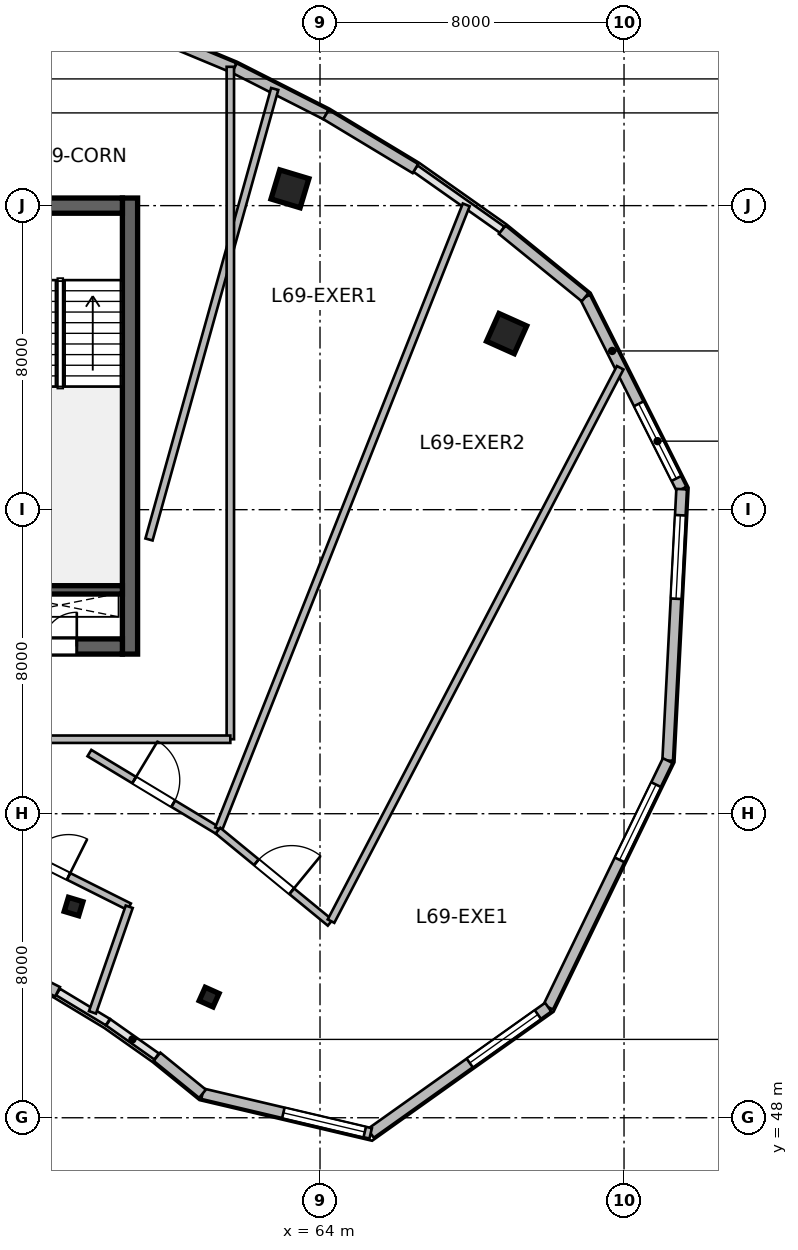
"""IFC4 building model, lengths in metres.
Left out: names, types, materials, properties, quantities, classifications, styles, units other than length and angle.
Written with IfcOpenShell. Run it as: python <this file> out.ifc"""

import sys

from ifc_helpers import new_model, si_unit, direction, frame, frame_2d, origin, origin_2d, place, context, subcontext, project, spatial, rectangle, i_section, extrude, source, transform, mapped, element, fill, save


model = new_model("IFC4")
c1 = context("Model", 3, precision=1e-05, world=origin(), true_north=direction((0.0, 1.0)))
c2 = subcontext(c1, "Body", "Model", "MODEL_VIEW")
j1 = project(units=[si_unit("LENGTHUNIT", "METRE"), si_unit("PLANEANGLEUNIT", "RADIAN")], contexts=[c1])
p1 = place(None, origin())
s1 = spatial("IfcSite", under=j1, at=p1, CompositionType="ELEMENT")
p2 = place(p1, origin())
s2 = spatial("IfcBuilding", under=s1, at=p2, CompositionType="ELEMENT")
p3 = place(p2, frame((0.0, 0.0, 283.5)))
s3 = spatial("IfcBuildingStorey", under=s2, at=p3, CompositionType="ELEMENT", Elevation=283.5)
m1 = source(origin(), c2, "Body", "SweptSolid", [
    extrude(rectangle(XDim=12.0, YDim=0.4, at=frame_2d((6.0, 0.0))), origin(), (0.0, 0.0, 1.0), 3.9),
])
p4 = place(p3, frame((59.0, 60.2, 0.0), z_axis=(0.0, 0.0, 1.0), x_axis=(0.0, 1.0, 0.0)))
e1 = element("IfcWall", 1, at=p4, inside=s3, PredefinedType="SHEAR", context=c2, shape_type="MappedRepresentation", body=[
    mapped(m1, transform((0.0, 0.0, 0.0), scale=1.0)),
])
m2 = source(origin(), c2, "Body", "SweptSolid", [
    extrude(rectangle(XDim=21.6, YDim=0.4, at=frame_2d((10.8, 0.0))), origin(), (0.0, 0.0, 1.0), 3.9),
])
p5 = place(p3, frame((37.2, 60.4, 0.0), z_axis=(0.0, 0.0, 1.0), x_axis=(1.0, 0.0, 0.0)))
e2 = element("IfcWall", 2, at=p5, inside=s3, PredefinedType="SHEAR", context=c2, shape_type="MappedRepresentation", body=[
    mapped(m2, transform((0.0, 0.0, 0.0), scale=1.0)),
])
p6 = place(p5, frame((1.1, 0.0, 0.0)))
e3 = element("IfcOpeningElement", 3, at=p6, cuts=e2, PredefinedType="OPENING", context=c2, shape_type="SweptSolid", body=[
    extrude(rectangle(XDim=1.15, YDim=2.15, at=frame_2d((0.575, 1.075))), frame((0.0, 0.21, 0.0), z_axis=(0.0, -1.0, 0.0), x_axis=(1.0, 0.0, 0.0)), (0.0, 0.0, 1.0), 0.42),
])
p7 = place(p5, frame((19.5, 0.0, 0.0)))
e4 = element("IfcOpeningElement", 4, at=p7, cuts=e2, PredefinedType="OPENING", context=c2, shape_type="SweptSolid", body=[
    extrude(rectangle(XDim=0.9, YDim=2.1, at=frame_2d((0.45, 1.05))), frame((0.0, 0.21, 0.0), z_axis=(0.0, -1.0, 0.0), x_axis=(1.0, 0.0, 0.0)), (0.0, 0.0, 1.0), 0.42),
])
p8 = place(p5, frame((12.02, 0.0, 0.0)))
e5 = element("IfcOpeningElement", 5, at=p8, cuts=e2, PredefinedType="OPENING", context=c2, shape_type="SweptSolid", body=[
    extrude(rectangle(XDim=1.6, YDim=2.15, at=frame_2d((0.8, 1.075))), frame((0.0, 0.21, 0.0), z_axis=(0.0, -1.0, 0.0), x_axis=(1.0, 0.0, 0.0)), (0.0, 0.0, 1.0), 0.42),
])
p9 = place(p3, frame((37.2, 72.0, 0.0), z_axis=(0.0, 0.0, 1.0), x_axis=(1.0, 0.0, 0.0)))
e6 = element("IfcWall", 6, at=p9, inside=s3, PredefinedType="SHEAR", context=c2, shape_type="MappedRepresentation", body=[
    mapped(m2, transform((0.0, 0.0, 0.0), scale=1.0)),
])
p10 = place(p9, frame((1.2, 0.0, 0.0)))
e7 = element("IfcOpeningElement", 7, at=p10, cuts=e6, PredefinedType="OPENING", context=c2, shape_type="SweptSolid", body=[
    extrude(rectangle(XDim=0.9, YDim=2.1, at=frame_2d((0.45, 1.05))), frame((0.0, 0.21, 0.0), z_axis=(0.0, -1.0, 0.0), x_axis=(1.0, 0.0, 0.0)), (0.0, 0.0, 1.0), 0.42),
])
p11 = place(p9, frame((14.7, 0.0, 0.0)))
e8 = element("IfcOpeningElement", 8, at=p11, cuts=e6, PredefinedType="OPENING", context=c2, shape_type="SweptSolid", body=[
    extrude(rectangle(XDim=1.2, YDim=2.15, at=frame_2d((0.6, 1.075))), frame((0.0, 0.21, 0.0), z_axis=(0.0, -1.0, 0.0), x_axis=(1.0, 0.0, 0.0)), (0.0, 0.0, 1.0), 0.42),
])
p12 = place(p9, frame((4.15, 0.0, 0.0)))
e9 = element("IfcOpeningElement", 9, at=p12, cuts=e6, PredefinedType="OPENING", context=c2, shape_type="SweptSolid", body=[
    extrude(rectangle(XDim=1.3, YDim=2.15, at=frame_2d((0.65, 1.075))), frame((0.0, 0.21, 0.0), z_axis=(0.0, -1.0, 0.0), x_axis=(1.0, 0.0, 0.0)), (0.0, 0.0, 1.0), 0.42),
])
p13 = place(p9, frame((7.25, 0.0, 0.0)))
e10 = element("IfcOpeningElement", 10, at=p13, cuts=e6, PredefinedType="OPENING", context=c2, shape_type="SweptSolid", body=[
    extrude(rectangle(XDim=0.9, YDim=2.1, at=frame_2d((0.45, 1.05))), frame((0.0, 0.21, 0.0), z_axis=(0.0, -1.0, 0.0), x_axis=(1.0, 0.0, 0.0)), (0.0, 0.0, 1.0), 0.42),
])
m3 = source(origin(), c2, "Body", "SweptSolid", [
    extrude(rectangle(XDim=3.27, YDim=0.22, at=frame_2d((1.635, 0.0))), origin(), (0.0, 0.0, 1.0), 3.9),
])
p14 = place(p3, frame((55.53, 61.89, 0.0), z_axis=(0.0, 0.0, 1.0), x_axis=(1.0, 0.0, 0.0)))
e11 = element("IfcWall", 11, at=p14, inside=s3, PredefinedType="SHEAR", context=c2, shape_type="MappedRepresentation", body=[
    mapped(m3, transform((0.0, 0.0, 0.0), scale=1.0)),
])
m4 = source(origin(), c2, "Body", "SweptSolid", [
    extrude(i_section(OverallWidth=0.399, OverallDepth=0.387, WebThickness=0.021, FlangeThickness=0.033, at=origin_2d()), origin(), (0.0, 0.0, 1.0), 3.9),
])
p15 = place(p3, frame((57.515, 53.558, 0.0), z_axis=(0.0, 0.0, 1.0), x_axis=(0.288697611798, 0.957420330337, 0.0)))
e12 = element("IfcColumn", 12, at=p15, inside=s3, PredefinedType="COLUMN", context=c2, shape_type="MappedRepresentation", body=[
    mapped(m4, transform((0.0, 0.0, 0.0), scale=1.0)),
])
m5 = source(origin(), c2, "Body", "SweptSolid", [
    extrude(rectangle(XDim=0.8, YDim=0.8, at=origin_2d()), origin(), (0.0, 0.0, 1.0), 3.9),
])
p16 = place(p3, frame((63.209, 72.442, 0.0), z_axis=(0.0, 0.0, 1.0), x_axis=(0.288697611798, 0.957420330337, 0.0)))
e13 = element("IfcColumn", 13, at=p16, inside=s3, PredefinedType="COLUMN", context=c2, shape_type="MappedRepresentation", body=[
    mapped(m5, transform((0.0, 0.0, 0.0), scale=1.0)),
])
p17 = place(p3, frame((61.082, 51.175, 0.0), z_axis=(0.0, 0.0, 1.0), x_axis=(0.409126902895, 0.912477494148, 0.0)))
e14 = element("IfcColumn", 14, at=p17, inside=s3, PredefinedType="COLUMN", context=c2, shape_type="MappedRepresentation", body=[
    mapped(m4, transform((0.0, 0.0, 0.0), scale=1.0)),
])
p18 = place(p3, frame((68.91, 68.633, 0.0), z_axis=(0.0, 0.0, 1.0), x_axis=(0.409126902895, 0.912477494148, 0.0)))
e15 = element("IfcColumn", 15, at=p18, inside=s3, PredefinedType="COLUMN", context=c2, shape_type="MappedRepresentation", body=[
    mapped(m5, transform((0.0, 0.0, 0.0), scale=1.0)),
])
m6 = source(origin(), c2, "Body", "SweptSolid", [
    extrude(rectangle(XDim=5.653, YDim=0.28, at=frame_2d((2.827, 0.0))), origin(), (0.0, 0.0, 1.0), 3.64),
])
p19 = place(p3, frame((70.976, 69.591, 0.0), z_axis=(0.0, 0.0, 1.0), x_axis=(0.449302555419, -0.893379658205, 0.0)))
e16 = element("IfcWall", 16, at=p19, inside=s3, PredefinedType="SOLIDWALL", context=c2, shape_type="MappedRepresentation", body=[
    mapped(m6, transform((0.0, 0.0, 0.0), scale=1.0)),
])
p20 = place(p19, frame((3.14, 0.0, 0.95)))
e17 = element("IfcOpeningElement", 17, at=p20, cuts=e16, PredefinedType="OPENING", context=c2, shape_type="SweptSolid", body=[
    extrude(rectangle(XDim=2.2, YDim=2.1, at=frame_2d((1.1, 1.05))), frame((0.0, 0.15, 0.0), z_axis=(0.0, -1.0, 0.0), x_axis=(1.0, 0.0, 0.0)), (0.0, 0.0, 1.0), 0.3),
])
m7 = source(origin(), c2, "Body", "SweptSolid", [
    extrude(rectangle(XDim=7.151, YDim=0.28, at=frame_2d((3.576, 0.0))), origin(), (0.0, 0.0, 1.0), 3.64),
])
p21 = place(p3, frame((73.516, 64.54, 0.0), z_axis=(0.0, 0.0, 1.0), x_axis=(-0.051449614265, -0.998675591567, 0.0)))
e18 = element("IfcWall", 18, at=p21, inside=s3, PredefinedType="SOLIDWALL", context=c2, shape_type="MappedRepresentation", body=[
    mapped(m7, transform((0.0, 0.0, 0.0), scale=1.0)),
])
p22 = place(p21, frame((0.688, 0.0, 0.95)))
e19 = element("IfcOpeningElement", 19, at=p22, cuts=e18, PredefinedType="OPENING", context=c2, shape_type="SweptSolid", body=[
    extrude(rectangle(XDim=2.2, YDim=2.1, at=frame_2d((1.1, 1.05))), frame((0.0, 0.15, 0.0), z_axis=(0.0, -1.0, 0.0), x_axis=(1.0, 0.0, 0.0)), (0.0, 0.0, 1.0), 0.3),
])
m8 = source(origin(), c2, "Body", "SweptSolid", [
    extrude(rectangle(XDim=7.211, YDim=0.28, at=frame_2d((3.606, 0.0))), origin(), (0.0, 0.0, 1.0), 3.64),
])
p23 = place(p3, frame((73.148, 57.399, 0.0), z_axis=(0.0, 0.0, 1.0), x_axis=(-0.436088263006, -0.899903898685, 0.0)))
e20 = element("IfcWall", 20, at=p23, inside=s3, PredefinedType="SOLIDWALL", context=c2, shape_type="MappedRepresentation", body=[
    mapped(m8, transform((0.0, 0.0, 0.0), scale=1.0)),
])
p24 = place(p23, frame((0.703, 0.0, 0.95)))
e21 = element("IfcOpeningElement", 21, at=p24, cuts=e20, PredefinedType="OPENING", context=c2, shape_type="SweptSolid", body=[
    extrude(rectangle(XDim=2.2, YDim=2.1, at=frame_2d((1.1, 1.05))), frame((0.0, 0.15, 0.0), z_axis=(0.0, -1.0, 0.0), x_axis=(1.0, 0.0, 0.0)), (0.0, 0.0, 1.0), 0.3),
])
m9 = source(origin(), c2, "Body", "SweptSolid", [
    extrude(rectangle(XDim=5.731, YDim=0.28, at=frame_2d((2.865, 0.0))), origin(), (0.0, 0.0, 1.0), 3.64),
])
p25 = place(p3, frame((70.004, 50.909, 0.0), z_axis=(0.0, 0.0, 1.0), x_axis=(-0.815021045908, -0.579431354629, 0.0)))
e22 = element("IfcWall", 22, at=p25, inside=s3, PredefinedType="SOLIDWALL", context=c2, shape_type="MappedRepresentation", body=[
    mapped(m9, transform((0.0, 0.0, 0.0), scale=1.0)),
])
p26 = place(p25, frame((0.333, 0.0, 0.95)))
e23 = element("IfcOpeningElement", 23, at=p26, cuts=e22, PredefinedType="OPENING", context=c2, shape_type="SweptSolid", body=[
    extrude(rectangle(XDim=2.2, YDim=2.1, at=frame_2d((1.1, 1.05))), frame((0.0, 0.15, 0.0), z_axis=(0.0, -1.0, 0.0), x_axis=(1.0, 0.0, 0.0)), (0.0, 0.0, 1.0), 0.3),
])
m10 = source(origin(), c2, "Body", "SweptSolid", [
    extrude(rectangle(XDim=4.547, YDim=0.28, at=frame_2d((2.273, 0.0))), origin(), (0.0, 0.0, 1.0), 3.64),
])
p27 = place(p3, frame((65.333, 47.589, 0.0), z_axis=(0.0, 0.0, 1.0), x_axis=(-0.973332593516, 0.229398479505, 0.0)))
e24 = element("IfcWall", 24, at=p27, inside=s3, PredefinedType="SOLIDWALL", context=c2, shape_type="MappedRepresentation", body=[
    mapped(m10, transform((0.0, 0.0, 0.0), scale=1.0)),
])
p28 = place(p27, frame((0.16, 0.0, 0.95)))
e25 = element("IfcOpeningElement", 25, at=p28, cuts=e24, PredefinedType="OPENING", context=c2, shape_type="SweptSolid", body=[
    extrude(rectangle(XDim=2.2, YDim=2.1, at=frame_2d((1.1, 1.05))), frame((0.0, 0.15, 0.0), z_axis=(0.0, -1.0, 0.0), x_axis=(1.0, 0.0, 0.0)), (0.0, 0.0, 1.0), 0.3),
])
m11 = source(origin(), c2, "Body", "SweptSolid", [
    extrude(rectangle(XDim=1.543, YDim=0.28, at=frame_2d((0.772, 0.0))), origin(), (0.0, 0.0, 1.0), 3.64),
])
p29 = place(p3, frame((60.908, 48.632, 0.0), z_axis=(0.0, 0.0, 1.0), x_axis=(-0.77582846857, 0.63094388606, 0.0)))
e26 = element("IfcWall", 26, at=p29, inside=s3, PredefinedType="SOLIDWALL", context=c2, shape_type="MappedRepresentation", body=[
    mapped(m11, transform((0.0, 0.0, 0.0), scale=1.0)),
])
m12 = source(origin(), c2, "Body", "SweptSolid", [
    extrude(rectangle(XDim=1.509, YDim=0.28, at=frame_2d((0.754, 0.0))), origin(), (0.0, 0.0, 1.0), 3.64),
])
p30 = place(p3, frame((57.094, 51.315, 0.0), z_axis=(0.0, 0.0, 1.0), x_axis=(-0.89169189228, 0.452642871635, 0.0)))
e27 = element("IfcWall", 27, at=p30, inside=s3, PredefinedType="SOLIDWALL", context=c2, shape_type="MappedRepresentation", body=[
    mapped(m12, transform((0.0, 0.0, 0.0), scale=1.0)),
])
m13 = source(origin(), c2, "Body", "SweptSolid", [
    extrude(rectangle(XDim=2.668, YDim=0.28, at=frame_2d((1.334, 0.0))), origin(), (0.0, 0.0, 1.0), 3.64),
])
p31 = place(p3, frame((59.281, 76.645, 0.0), z_axis=(0.0, 0.0, 1.0), x_axis=(0.923290633029, -0.384102078828, 0.0)))
e28 = element("IfcWall", 28, at=p31, inside=s3, PredefinedType="SOLIDWALL", context=c2, shape_type="MappedRepresentation", body=[
    mapped(m13, transform((0.0, 0.0, 0.0), scale=1.0)),
])
m14 = source(origin(), c2, "Body", "SweptSolid", [
    extrude(rectangle(XDim=2.706, YDim=0.28, at=frame_2d((1.353, 0.0))), origin(), (0.0, 0.0, 1.0), 3.64),
])
p32 = place(p3, frame((61.745, 75.62, 0.0), z_axis=(0.0, 0.0, 1.0), x_axis=(0.891648836287, -0.452727680564, 0.0)))
e29 = element("IfcWall", 29, at=p32, inside=s3, PredefinedType="SOLIDWALL", context=c2, shape_type="MappedRepresentation", body=[
    mapped(m14, transform((0.0, 0.0, 0.0), scale=1.0)),
])
m15 = source(origin(), c2, "Body", "SweptSolid", [
    extrude(rectangle(XDim=2.748, YDim=0.28, at=frame_2d((1.374, 0.0))), origin(), (0.0, 0.0, 1.0), 3.64),
])
p33 = place(p3, frame((64.157, 74.396, 0.0), z_axis=(0.0, 0.0, 1.0), x_axis=(0.856149718453, -0.516727838996, 0.0)))
e30 = element("IfcWall", 30, at=p33, inside=s3, PredefinedType="SOLIDWALL", context=c2, shape_type="MappedRepresentation", body=[
    mapped(m15, transform((0.0, 0.0, 0.0), scale=1.0)),
])
m16 = source(origin(), c2, "Body", "SweptSolid", [
    extrude(rectangle(XDim=2.812, YDim=0.28, at=frame_2d((1.406, 0.0))), origin(), (0.0, 0.0, 1.0), 3.64),
])
p34 = place(p3, frame((68.795, 71.365, 0.0), z_axis=(0.0, 0.0, 1.0), x_axis=(0.775880230716, -0.630880232361, 0.0)))
e31 = element("IfcWall", 31, at=p34, inside=s3, PredefinedType="SOLIDWALL", context=c2, shape_type="MappedRepresentation", body=[
    mapped(m16, transform((0.0, 0.0, 0.0), scale=1.0)),
])
m17 = source(origin(), c2, "Body", "SweptSolid", [
    extrude(rectangle(XDim=4.271, YDim=0.195, at=frame_2d((2.135, 0.0))), origin(), (0.0, 0.0, 1.0), 3.64),
])
p35 = place(p3, frame((55.161, 55.465, 0.0), z_axis=(0.0, 0.0, 1.0), x_axis=(0.894061035522, -0.447945158207, 0.0)))
e32 = element("IfcWall", 32, at=p35, inside=s3, PredefinedType="PARTITIONING", context=c2, shape_type="MappedRepresentation", body=[
    mapped(m17, transform((0.0, 0.0, 0.0), scale=1.0)),
])
p36 = place(p35, frame((1.385, 0.0, 0.0)))
e33 = element("IfcOpeningElement", 33, at=p36, cuts=e32, PredefinedType="OPENING", context=c2, shape_type="SweptSolid", body=[
    extrude(rectangle(XDim=1.1, YDim=2.15, at=frame_2d((0.55, 1.075))), frame((0.0, 0.107, 0.0), z_axis=(0.0, -1.0, 0.0), x_axis=(1.0, 0.0, 0.0)), (0.0, 0.0, 1.0), 0.215),
])
m18 = source(origin(), c2, "Body", "SweptSolid", [
    extrude(rectangle(XDim=2.942, YDim=0.195, at=frame_2d((1.471, 0.0))), origin(), (0.0, 0.0, 1.0), 3.64),
])
p37 = place(p3, frame((58.013, 50.773, 0.0), z_axis=(0.0, 0.0, 1.0), x_axis=(0.328623620494, 0.944460965871, 0.0)))
e34 = element("IfcWall", 34, at=p37, inside=s3, PredefinedType="PARTITIONING", context=c2, shape_type="MappedRepresentation", body=[
    mapped(m18, transform((0.0, 0.0, 0.0), scale=1.0)),
])
m19 = source(origin(), c2, "Body", "SweptSolid", [
    extrude(rectangle(XDim=3.951, YDim=0.195, at=frame_2d((1.975, 0.0))), origin(), (0.0, 0.0, 1.0), 3.64),
])
p38 = place(p3, frame((57.932, 57.596, 0.0), z_axis=(0.0, 0.0, 1.0), x_axis=(0.856137696849, -0.51674775668, 0.0)))
e35 = element("IfcWall", 35, at=p38, inside=s3, PredefinedType="PARTITIONING", context=c2, shape_type="MappedRepresentation", body=[
    mapped(m19, transform((0.0, 0.0, 0.0), scale=1.0)),
])
p39 = place(p38, frame((1.375, 0.0, 0.0)))
e36 = element("IfcOpeningElement", 36, at=p39, cuts=e35, PredefinedType="OPENING", context=c2, shape_type="SweptSolid", body=[
    extrude(rectangle(XDim=1.2, YDim=2.15, at=frame_2d((0.6, 1.075))), frame((0.0, 0.107, 0.0), z_axis=(0.0, -1.0, 0.0), x_axis=(1.0, 0.0, 0.0)), (0.0, 0.0, 1.0), 0.215),
])
m20 = source(origin(), c2, "Body", "SweptSolid", [
    extrude(rectangle(XDim=12.307, YDim=0.195, at=frame_2d((6.153, 0.0))), origin(), (0.0, 0.0, 1.0), 3.64),
])
p40 = place(p3, frame((59.5, 63.216, 0.0), z_axis=(0.0, 0.0, 1.0), x_axis=(0.268768150257, 0.96320490105, 0.0)))
e37 = element("IfcWall", 37, at=p40, inside=s3, PredefinedType="PARTITIONING", context=c2, shape_type="MappedRepresentation", body=[
    mapped(m20, transform((0.0, 0.0, 0.0), scale=1.0)),
])
m21 = source(origin(), c2, "Body", "SweptSolid", [
    extrude(rectangle(XDim=17.664, YDim=0.195, at=frame_2d((8.832, 0.0))), origin(), (0.0, 0.0, 1.0), 3.64),
])
p41 = place(p3, frame((61.333, 55.602, 0.0), z_axis=(0.0, 0.0, 1.0), x_axis=(0.368827513738, 0.929497856431, 0.0)))
e38 = element("IfcWall", 38, at=p41, inside=s3, PredefinedType="PARTITIONING", context=c2, shape_type="MappedRepresentation", body=[
    mapped(m21, transform((0.0, 0.0, 0.0), scale=1.0)),
])
m22 = source(origin(), c2, "Body", "SweptSolid", [
    extrude(rectangle(XDim=3.82, YDim=0.195, at=frame_2d((1.91, 0.0))), origin(), (0.0, 0.0, 1.0), 3.64),
])
p42 = place(p3, frame((61.314, 55.554, 0.0), z_axis=(0.0, 0.0, 1.0), x_axis=(0.772805728445, -0.63464266015, 0.0)))
e39 = element("IfcWall", 39, at=p42, inside=s3, PredefinedType="PARTITIONING", context=c2, shape_type="MappedRepresentation", body=[
    mapped(m22, transform((0.0, 0.0, 0.0), scale=1.0)),
])
p43 = place(p42, frame((1.31, 0.0, 0.0)))
e40 = element("IfcOpeningElement", 40, at=p43, cuts=e39, PredefinedType="OPENING", context=c2, shape_type="SweptSolid", body=[
    extrude(rectangle(XDim=1.2, YDim=2.15, at=frame_2d((0.6, 1.075))), frame((0.0, 0.107, 0.0), z_axis=(0.0, -1.0, 0.0), x_axis=(1.0, 0.0, 0.0)), (0.0, 0.0, 1.0), 0.215),
])
m23 = source(origin(), c2, "Body", "SweptSolid", [
    extrude(rectangle(XDim=16.43, YDim=0.195, at=frame_2d((8.215, 0.0))), origin(), (0.0, 0.0, 1.0), 3.64),
])
p44 = place(p3, frame((64.29, 53.174, 0.0), z_axis=(0.0, 0.0, 1.0), x_axis=(0.463119459371, 0.886295868405, 0.0)))
e41 = element("IfcWall", 41, at=p44, inside=s3, PredefinedType="PARTITIONING", context=c2, shape_type="MappedRepresentation", body=[
    mapped(m23, transform((0.0, 0.0, 0.0), scale=1.0)),
])
m24 = source(origin(), c2, "Body", "SweptSolid", [
    extrude(rectangle(XDim=17.693, YDim=0.195, at=frame_2d((8.847, 0.0))), origin(), (0.0, 0.0, 1.0), 3.64),
])
p45 = place(p3, frame((61.64, 57.96, 0.0), z_axis=(0.0, 0.0, 1.0), x_axis=(0.0, 1.0, 0.0)))
e42 = element("IfcWall", 42, at=p45, inside=s3, PredefinedType="PARTITIONING", context=c2, shape_type="MappedRepresentation", body=[
    mapped(m24, transform((0.0, 0.0, 0.0), scale=1.0)),
])
m25 = source(origin(), c2, "Body", "SweptSolid", [
    extrude(rectangle(XDim=12.39, YDim=0.195, at=frame_2d((6.195, 0.0))), origin(), (0.0, 0.0, 1.0), 3.64),
])
p46 = place(p3, frame((49.25, 57.96, 0.0), z_axis=(0.0, 0.0, 1.0), x_axis=(1.0, 0.0, 0.0)))
e43 = element("IfcWall", 43, at=p46, inside=s3, PredefinedType="PARTITIONING", context=c2, shape_type="MappedRepresentation", body=[
    mapped(m25, transform((0.0, 0.0, 0.0), scale=1.0)),
])
m26 = source(origin(), c2, "Body", "SweptSolid", [
    extrude(rectangle(XDim=2.2, YDim=2.1, at=frame_2d((1.1, 1.05))), frame((0.0, 0.03, 0.0), z_axis=(0.0, -1.0, 0.0), x_axis=(1.0, 0.0, 0.0)), (0.0, 0.0, 1.0), 0.06),
])
p47 = place(p20, origin())
e44 = element("IfcWindow", 44, at=p47, inside=s3, PartitioningType="TRIPLE_PANEL_VERTICAL", PredefinedType="WINDOW", context=c2, shape_type="MappedRepresentation", body=[
    mapped(m26, transform((0.0, 0.0, 0.0), scale=1.0)),
])
fill(e17, e44)
p48 = place(p22, origin())
e45 = element("IfcWindow", 45, at=p48, inside=s3, PartitioningType="TRIPLE_PANEL_VERTICAL", PredefinedType="WINDOW", context=c2, shape_type="MappedRepresentation", body=[
    mapped(m26, transform((0.0, 0.0, 0.0), scale=1.0)),
])
fill(e19, e45)
p49 = place(p24, origin())
e46 = element("IfcWindow", 46, at=p49, inside=s3, PartitioningType="TRIPLE_PANEL_VERTICAL", PredefinedType="WINDOW", context=c2, shape_type="MappedRepresentation", body=[
    mapped(m26, transform((0.0, 0.0, 0.0), scale=1.0)),
])
fill(e21, e46)
p50 = place(p26, origin())
e47 = element("IfcWindow", 47, at=p50, inside=s3, PartitioningType="TRIPLE_PANEL_VERTICAL", PredefinedType="WINDOW", context=c2, shape_type="MappedRepresentation", body=[
    mapped(m26, transform((0.0, 0.0, 0.0), scale=1.0)),
])
fill(e23, e47)
p51 = place(p28, origin())
e48 = element("IfcWindow", 48, at=p51, inside=s3, PartitioningType="TRIPLE_PANEL_VERTICAL", PredefinedType="WINDOW", context=c2, shape_type="MappedRepresentation", body=[
    mapped(m26, transform((0.0, 0.0, 0.0), scale=1.0)),
])
fill(e25, e48)
m27 = source(origin(), c2, "Body", "SweptSolid", [
    extrude(rectangle(XDim=0.9, YDim=2.1, at=frame_2d((0.45, 1.05))), frame((0.0, 0.025, 0.0), z_axis=(0.0, -1.0, 0.0), x_axis=(1.0, 0.0, 0.0)), (0.0, 0.0, 1.0), 0.05),
])
p52 = place(p7, origin())
e49 = element("IfcDoor", 49, at=p52, inside=s3, OperationType="SINGLE_SWING_RIGHT", PredefinedType="DOOR", context=c2, shape_type="MappedRepresentation", body=[
    mapped(m27, transform((0.0, 0.0, 0.0), scale=1.0)),
])
fill(e4, e49)
m28 = source(origin(), c2, "Body", "SweptSolid", [
    extrude(rectangle(XDim=1.1, YDim=2.15, at=frame_2d((0.55, 1.075))), frame((0.0, 0.025, 0.0), z_axis=(0.0, -1.0, 0.0), x_axis=(1.0, 0.0, 0.0)), (0.0, 0.0, 1.0), 0.05),
])
p53 = place(p36, origin())
e50 = element("IfcDoor", 50, at=p53, inside=s3, OperationType="SINGLE_SWING_RIGHT", PredefinedType="DOOR", context=c2, shape_type="MappedRepresentation", body=[
    mapped(m28, transform((0.0, 0.0, 0.0), scale=1.0)),
])
fill(e33, e50)
m29 = source(origin(), c2, "Body", "SweptSolid", [
    extrude(rectangle(XDim=1.2, YDim=2.15, at=frame_2d((0.6, 1.075))), frame((0.0, 0.025, 0.0), z_axis=(0.0, -1.0, 0.0), x_axis=(1.0, 0.0, 0.0)), (0.0, 0.0, 1.0), 0.05),
])
p54 = place(p39, origin())
e51 = element("IfcDoor", 51, at=p54, inside=s3, OperationType="SINGLE_SWING_LEFT", PredefinedType="DOOR", context=c2, shape_type="MappedRepresentation", body=[
    mapped(m29, transform((0.0, 0.0, 0.0), scale=1.0)),
])
fill(e36, e51)
p55 = place(p43, origin())
e52 = element("IfcDoor", 52, at=p55, inside=s3, OperationType="SINGLE_SWING_RIGHT", PredefinedType="DOOR", context=c2, shape_type="MappedRepresentation", body=[
    mapped(m29, transform((0.0, 0.0, 0.0), scale=1.0)),
])
fill(e40, e52)
save(model, sys.argv[1])
